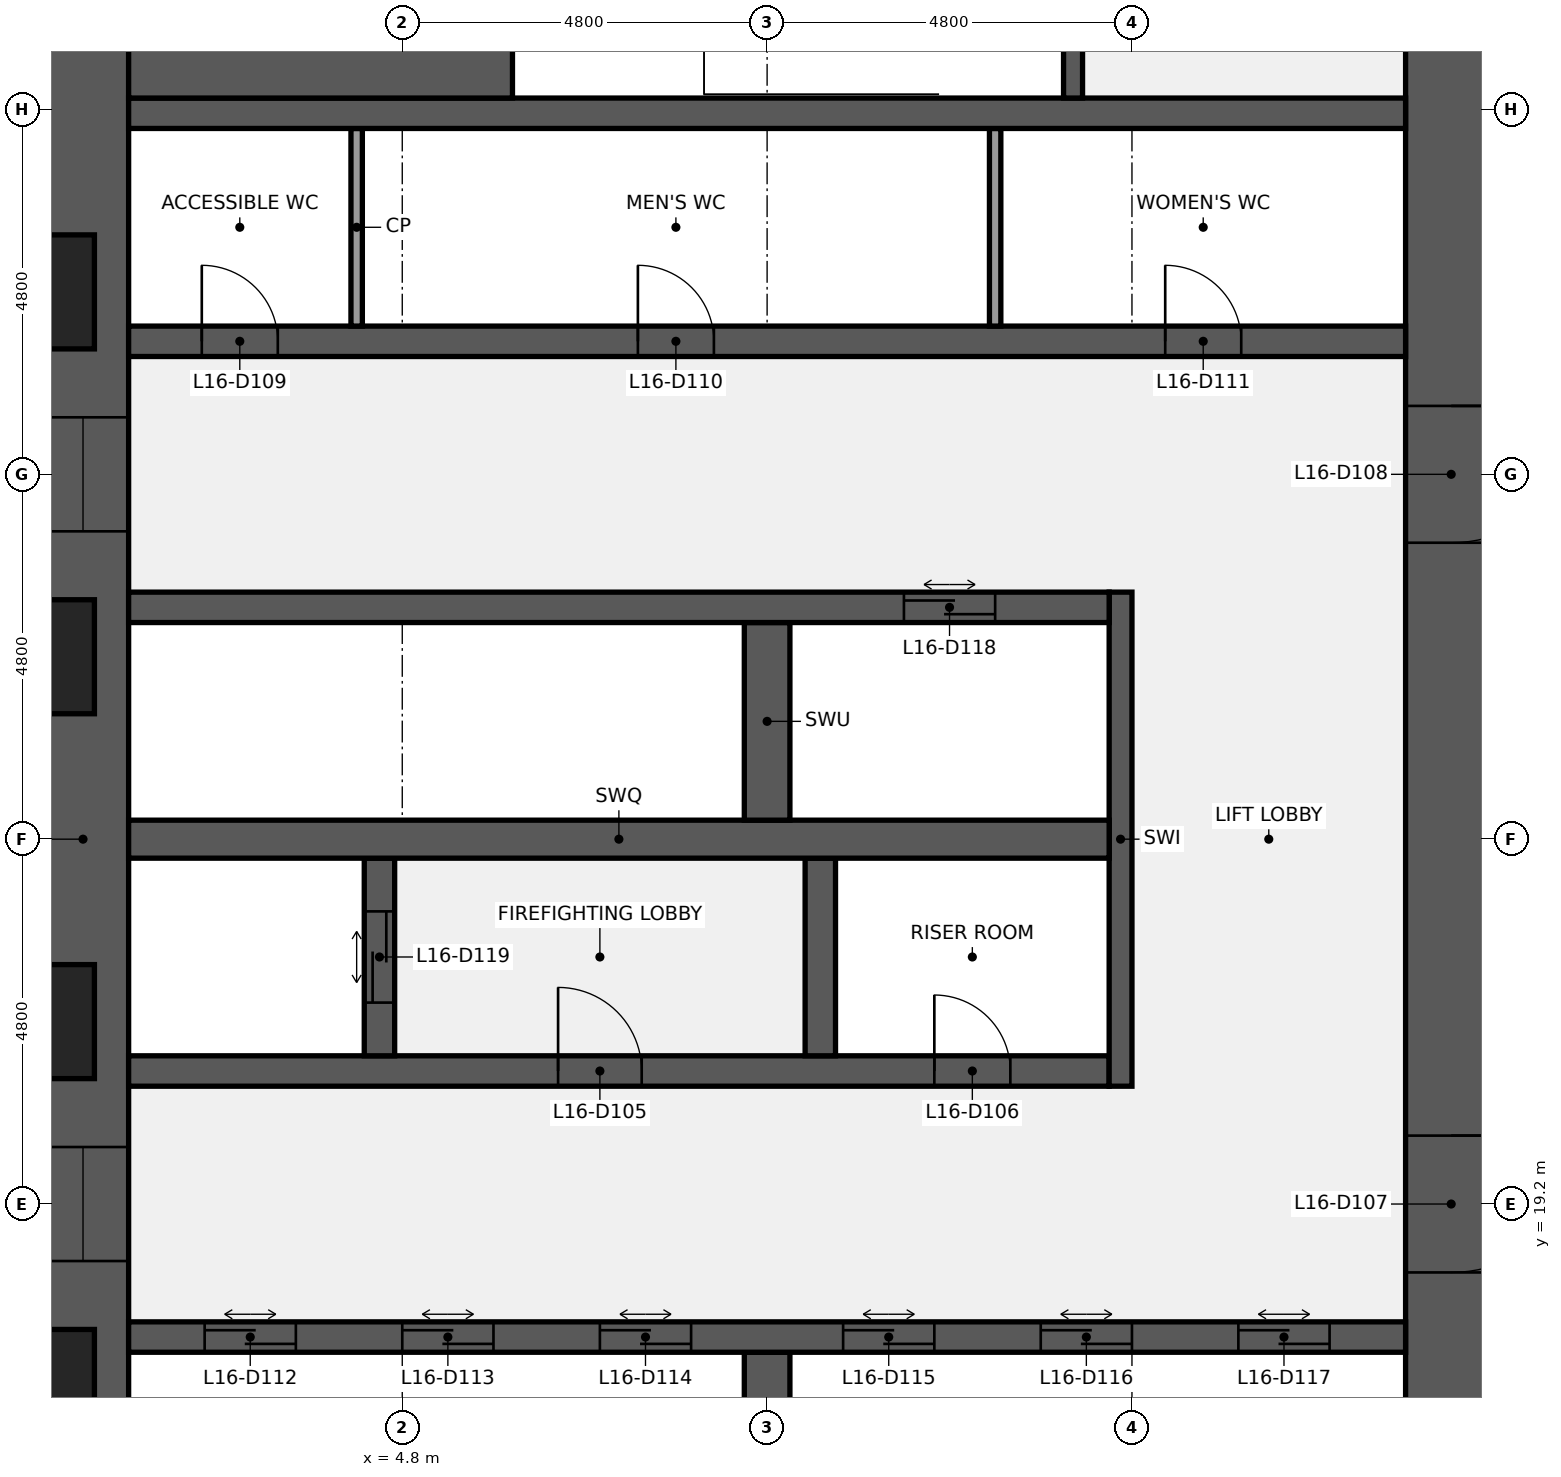
"""IFC4 building model, lengths in metres.
Left out: names, types, materials, properties, quantities, classifications, styles, units other than length and angle.
Written with IfcOpenShell. Run it as: python <this file> out.ifc"""

import sys

from ifc_helpers import new_model, si_unit, direction, frame, frame_2d, origin, place, context, subcontext, project, spatial, rectangle, extrude, element, fill, save


model = new_model("IFC4")
c1 = context("Model", 3, precision=1e-05, world=origin(), true_north=direction((0.0, 1.0)))
c2 = subcontext(c1, "Body", "Model", "MODEL_VIEW")
j1 = project(units=[si_unit("LENGTHUNIT", "METRE"), si_unit("PLANEANGLEUNIT", "RADIAN")], contexts=[c1])
p1 = place(None, origin())
s1 = spatial("IfcSite", under=j1, at=p1, CompositionType="ELEMENT")
p2 = place(p1, origin())
s2 = spatial("IfcBuilding", under=s1, at=p2, CompositionType="ELEMENT")
p3 = place(p2, frame((0.0, 0.0, 75.0)))
s3 = spatial("IfcBuildingStorey", under=s2, at=p3, CompositionType="ELEMENT", Elevation=75.0)
p4 = place(p3, frame((0.6, 9.6, 0.0), z_axis=(0.0, 0.0, 1.0), x_axis=(0.0, 1.0, 0.0)))
e1 = element("IfcWall", 1, at=p4, inside=s3, PredefinedType="SHEAR", context=c2, shape_type="SweptSolid", body=[
    extrude(rectangle(XDim=28.8, YDim=1.2, at=frame_2d((14.4, 0.0))), origin(), (0.0, 0.0, 1.0), 3.84),
])
p5 = place(p4, frame((8.85, 0.0, 0.9)))
e2 = element("IfcOpeningElement", 2, at=p5, cuts=e1, PredefinedType="OPENING", context=c2, shape_type="SweptSolid", body=[
    extrude(rectangle(XDim=1.5, YDim=1.5, at=frame_2d((0.75, 0.75))), frame((0.0, 0.61, 0.0), z_axis=(0.0, -1.0, 0.0), x_axis=(1.0, 0.0, 0.0)), (0.0, 0.0, 1.0), 1.22),
])
p6 = place(p4, frame((18.45, 0.0, 0.9)))
e3 = element("IfcOpeningElement", 3, at=p6, cuts=e1, PredefinedType="OPENING", context=c2, shape_type="SweptSolid", body=[
    extrude(rectangle(XDim=1.5, YDim=1.5, at=frame_2d((0.75, 0.75))), frame((0.0, 0.61, 0.0), z_axis=(0.0, -1.0, 0.0), x_axis=(1.0, 0.0, 0.0)), (0.0, 0.0, 1.0), 1.22),
])
p7 = place(p3, frame((18.6, 38.4, 0.0), z_axis=(0.0, 0.0, 1.0), x_axis=(0.0, -1.0, 0.0)))
e4 = element("IfcWall", 4, at=p7, inside=s3, PredefinedType="SHEAR", context=c2, shape_type="SweptSolid", body=[
    extrude(rectangle(XDim=28.8, YDim=1.2, at=frame_2d((14.4, 0.0))), origin(), (0.0, 0.0, 1.0), 3.84),
])
p8 = place(p7, frame((18.3, 0.0, 0.0)))
e5 = element("IfcOpeningElement", 5, at=p8, cuts=e4, PredefinedType="OPENING", context=c2, shape_type="SweptSolid", body=[
    extrude(rectangle(XDim=1.8, YDim=2.1, at=frame_2d((0.9, 1.05))), frame((0.0, 0.61, 0.0), z_axis=(0.0, -1.0, 0.0), x_axis=(1.0, 0.0, 0.0)), (0.0, 0.0, 1.0), 1.22),
])
p9 = place(p7, frame((8.7, 0.0, 0.0)))
e6 = element("IfcOpeningElement", 6, at=p9, cuts=e4, PredefinedType="OPENING", context=c2, shape_type="SweptSolid", body=[
    extrude(rectangle(XDim=1.8, YDim=2.1, at=frame_2d((0.9, 1.05))), frame((0.0, 0.61, 0.0), z_axis=(0.0, -1.0, 0.0), x_axis=(1.0, 0.0, 0.0)), (0.0, 0.0, 1.0), 1.22),
])
p10 = place(p3, frame((9.6, 14.65, 0.0), z_axis=(0.0, 0.0, 1.0), x_axis=(0.0, 1.0, 0.0)))
e7 = element("IfcWall", 7, at=p10, inside=s3, PredefinedType="SHEAR", context=c2, shape_type="SweptSolid", body=[
    extrude(rectangle(XDim=2.6, YDim=0.6, at=frame_2d((1.3, 0.0))), origin(), (0.0, 0.0, 1.0), 3.84),
])
p11 = place(p3, frame((1.2, 17.45, 0.0), z_axis=(0.0, 0.0, 1.0), x_axis=(1.0, 0.0, 0.0)))
e8 = element("IfcWall", 8, at=p11, inside=s3, PredefinedType="SHEAR", context=c2, shape_type="SweptSolid", body=[
    extrude(rectangle(XDim=16.8, YDim=0.4, at=frame_2d((8.4, 0.0))), origin(), (0.0, 0.0, 1.0), 3.84),
])
p12 = place(p11, frame((1.0, 0.0, 0.0)))
e9 = element("IfcOpeningElement", 9, at=p12, cuts=e8, PredefinedType="OPENING", context=c2, shape_type="SweptSolid", body=[
    extrude(rectangle(XDim=1.2, YDim=2.1, at=frame_2d((0.6, 1.05))), frame((0.0, 0.21, 0.0), z_axis=(0.0, -1.0, 0.0), x_axis=(1.0, 0.0, 0.0)), (0.0, 0.0, 1.0), 0.42),
])
p13 = place(p11, frame((3.6, 0.0, 0.0)))
e10 = element("IfcOpeningElement", 10, at=p13, cuts=e8, PredefinedType="OPENING", context=c2, shape_type="SweptSolid", body=[
    extrude(rectangle(XDim=1.2, YDim=2.1, at=frame_2d((0.6, 1.05))), frame((0.0, 0.21, 0.0), z_axis=(0.0, -1.0, 0.0), x_axis=(1.0, 0.0, 0.0)), (0.0, 0.0, 1.0), 0.42),
])
p14 = place(p11, frame((6.2, 0.0, 0.0)))
e11 = element("IfcOpeningElement", 11, at=p14, cuts=e8, PredefinedType="OPENING", context=c2, shape_type="SweptSolid", body=[
    extrude(rectangle(XDim=1.2, YDim=2.1, at=frame_2d((0.6, 1.05))), frame((0.0, 0.21, 0.0), z_axis=(0.0, -1.0, 0.0), x_axis=(1.0, 0.0, 0.0)), (0.0, 0.0, 1.0), 0.42),
])
p15 = place(p11, frame((9.4, 0.0, 0.0)))
e12 = element("IfcOpeningElement", 12, at=p15, cuts=e8, PredefinedType="OPENING", context=c2, shape_type="SweptSolid", body=[
    extrude(rectangle(XDim=1.2, YDim=2.1, at=frame_2d((0.6, 1.05))), frame((0.0, 0.21, 0.0), z_axis=(0.0, -1.0, 0.0), x_axis=(1.0, 0.0, 0.0)), (0.0, 0.0, 1.0), 0.42),
])
p16 = place(p11, frame((12.0, 0.0, 0.0)))
e13 = element("IfcOpeningElement", 13, at=p16, cuts=e8, PredefinedType="OPENING", context=c2, shape_type="SweptSolid", body=[
    extrude(rectangle(XDim=1.2, YDim=2.1, at=frame_2d((0.6, 1.05))), frame((0.0, 0.21, 0.0), z_axis=(0.0, -1.0, 0.0), x_axis=(1.0, 0.0, 0.0)), (0.0, 0.0, 1.0), 0.42),
])
p17 = place(p11, frame((14.6, 0.0, 0.0)))
e14 = element("IfcOpeningElement", 14, at=p17, cuts=e8, PredefinedType="OPENING", context=c2, shape_type="SweptSolid", body=[
    extrude(rectangle(XDim=1.2, YDim=2.1, at=frame_2d((0.6, 1.05))), frame((0.0, 0.21, 0.0), z_axis=(0.0, -1.0, 0.0), x_axis=(1.0, 0.0, 0.0)), (0.0, 0.0, 1.0), 0.42),
])
p18 = place(p3, frame((1.2, 20.95, 0.0), z_axis=(0.0, 0.0, 1.0), x_axis=(1.0, 0.0, 0.0)))
e15 = element("IfcWall", 15, at=p18, inside=s3, PredefinedType="SHEAR", context=c2, shape_type="SweptSolid", body=[
    extrude(rectangle(XDim=12.9, YDim=0.4, at=frame_2d((6.45, 0.0))), origin(), (0.0, 0.0, 1.0), 3.84),
])
p19 = place(p18, frame((5.65, 0.0, 0.0)))
e16 = element("IfcOpeningElement", 16, at=p19, cuts=e15, PredefinedType="OPENING", context=c2, shape_type="SweptSolid", body=[
    extrude(rectangle(XDim=1.1, YDim=2.1, at=frame_2d((0.55, 1.05))), frame((0.0, 0.21, 0.0), z_axis=(0.0, -1.0, 0.0), x_axis=(1.0, 0.0, 0.0)), (0.0, 0.0, 1.0), 0.42),
])
p20 = place(p18, frame((10.6, 0.0, 0.0)))
e17 = element("IfcOpeningElement", 17, at=p20, cuts=e15, PredefinedType="OPENING", context=c2, shape_type="SweptSolid", body=[
    extrude(rectangle(XDim=1.0, YDim=2.1, at=frame_2d((0.5, 1.05))), frame((0.0, 0.21, 0.0), z_axis=(0.0, -1.0, 0.0), x_axis=(1.0, 0.0, 0.0)), (0.0, 0.0, 1.0), 0.42),
])
p21 = place(p3, frame((14.25, 20.75, 0.0), z_axis=(0.0, 0.0, 1.0), x_axis=(0.0, 1.0, 0.0)))
e18 = element("IfcWall", 18, at=p21, inside=s3, PredefinedType="SHEAR", context=c2, shape_type="SweptSolid", body=[
    extrude(rectangle(XDim=6.5, YDim=0.3, at=frame_2d((3.25, 0.0))), origin(), (0.0, 0.0, 1.0), 3.84),
])
p22 = place(p3, frame((4.5, 21.15, 0.0), z_axis=(0.0, 0.0, 1.0), x_axis=(0.0, 1.0, 0.0)))
e19 = element("IfcWall", 19, at=p22, inside=s3, PredefinedType="SHEAR", context=c2, shape_type="SweptSolid", body=[
    extrude(rectangle(XDim=2.6, YDim=0.4, at=frame_2d((1.3, 0.0))), origin(), (0.0, 0.0, 1.0), 3.84),
])
p23 = place(p22, frame((0.7, 0.0, 0.0)))
e20 = element("IfcOpeningElement", 20, at=p23, cuts=e19, PredefinedType="OPENING", context=c2, shape_type="SweptSolid", body=[
    extrude(rectangle(XDim=1.2, YDim=2.1, at=frame_2d((0.6, 1.05))), frame((0.0, 0.21, 0.0), z_axis=(0.0, -1.0, 0.0), x_axis=(1.0, 0.0, 0.0)), (0.0, 0.0, 1.0), 0.42),
])
p24 = place(p3, frame((10.3, 21.15, 0.0), z_axis=(0.0, 0.0, 1.0), x_axis=(0.0, 1.0, 0.0)))
e21 = element("IfcWall", 21, at=p24, inside=s3, PredefinedType="SHEAR", context=c2, shape_type="SweptSolid", body=[
    extrude(rectangle(XDim=2.6, YDim=0.4, at=frame_2d((1.3, 0.0))), origin(), (0.0, 0.0, 1.0), 3.84),
])
p25 = place(p3, frame((1.2, 24.0, 0.0), z_axis=(0.0, 0.0, 1.0), x_axis=(1.0, 0.0, 0.0)))
e22 = element("IfcWall", 22, at=p25, inside=s3, PredefinedType="SHEAR", context=c2, shape_type="SweptSolid", body=[
    extrude(rectangle(XDim=12.9, YDim=0.5, at=frame_2d((6.45, 0.0))), origin(), (0.0, 0.0, 1.0), 3.84),
])
p26 = place(p3, frame((9.6, 24.25, 0.0), z_axis=(0.0, 0.0, 1.0), x_axis=(0.0, 1.0, 0.0)))
e23 = element("IfcWall", 23, at=p26, inside=s3, PredefinedType="SHEAR", context=c2, shape_type="SweptSolid", body=[
    extrude(rectangle(XDim=2.6, YDim=0.6, at=frame_2d((1.3, 0.0))), origin(), (0.0, 0.0, 1.0), 3.84),
])
p27 = place(p3, frame((1.2, 27.05, 0.0), z_axis=(0.0, 0.0, 1.0), x_axis=(1.0, 0.0, 0.0)))
e24 = element("IfcWall", 24, at=p27, inside=s3, PredefinedType="SHEAR", context=c2, shape_type="SweptSolid", body=[
    extrude(rectangle(XDim=12.9, YDim=0.4, at=frame_2d((6.45, 0.0))), origin(), (0.0, 0.0, 1.0), 3.84),
])
p28 = place(p27, frame((10.2, 0.0, 0.0)))
e25 = element("IfcOpeningElement", 25, at=p28, cuts=e24, PredefinedType="OPENING", context=c2, shape_type="SweptSolid", body=[
    extrude(rectangle(XDim=1.2, YDim=2.1, at=frame_2d((0.6, 1.05))), frame((0.0, 0.21, 0.0), z_axis=(0.0, -1.0, 0.0), x_axis=(1.0, 0.0, 0.0)), (0.0, 0.0, 1.0), 0.42),
])
p29 = place(p3, frame((1.2, 30.55, 0.0), z_axis=(0.0, 0.0, 1.0), x_axis=(1.0, 0.0, 0.0)))
e26 = element("IfcWall", 26, at=p29, inside=s3, PredefinedType="SHEAR", context=c2, shape_type="SweptSolid", body=[
    extrude(rectangle(XDim=16.8, YDim=0.4, at=frame_2d((8.4, 0.0))), origin(), (0.0, 0.0, 1.0), 3.84),
])
p30 = place(p29, frame((0.962, 0.0, 0.0)))
e27 = element("IfcOpeningElement", 27, at=p30, cuts=e26, PredefinedType="OPENING", context=c2, shape_type="SweptSolid", body=[
    extrude(rectangle(XDim=1.0, YDim=2.1, at=frame_2d((0.5, 1.05))), frame((0.0, 0.21, 0.0), z_axis=(0.0, -1.0, 0.0), x_axis=(1.0, 0.0, 0.0)), (0.0, 0.0, 1.0), 0.42),
])
p31 = place(p29, frame((6.7, 0.0, 0.0)))
e28 = element("IfcOpeningElement", 28, at=p31, cuts=e26, PredefinedType="OPENING", context=c2, shape_type="SweptSolid", body=[
    extrude(rectangle(XDim=1.0, YDim=2.1, at=frame_2d((0.5, 1.05))), frame((0.0, 0.21, 0.0), z_axis=(0.0, -1.0, 0.0), x_axis=(1.0, 0.0, 0.0)), (0.0, 0.0, 1.0), 0.42),
])
p32 = place(p29, frame((13.637, 0.0, 0.0)))
e29 = element("IfcOpeningElement", 29, at=p32, cuts=e26, PredefinedType="OPENING", context=c2, shape_type="SweptSolid", body=[
    extrude(rectangle(XDim=1.0, YDim=2.1, at=frame_2d((0.5, 1.05))), frame((0.0, 0.21, 0.0), z_axis=(0.0, -1.0, 0.0), x_axis=(1.0, 0.0, 0.0)), (0.0, 0.0, 1.0), 0.42),
])
for number, where, z_axis, x_axis in (
    (30, (4.2, 30.75, 0.0), (0.0, 0.0, 1.0), (0.0, 1.0, 0.0)),
    (31, (12.6, 30.75, 0.0), (0.0, 0.0, 1.0), (0.0, 1.0, 0.0)),
):
    element("IfcWall", number, at=place(p3, frame(where, z_axis=z_axis, x_axis=x_axis)), inside=s3, PredefinedType="PARTITIONING", context=c2, shape_type="SweptSolid", body=[
        extrude(rectangle(XDim=2.6, YDim=0.15, at=frame_2d((1.3, 0.0))), origin(), (0.0, 0.0, 1.0), 3.84),
    ])
p33 = place(p3, frame((1.2, 33.55, 0.0), z_axis=(0.0, 0.0, 1.0), x_axis=(1.0, 0.0, 0.0)))
e32 = element("IfcWall", 32, at=p33, inside=s3, PredefinedType="SHEAR", context=c2, shape_type="SweptSolid", body=[
    extrude(rectangle(XDim=16.8, YDim=0.4, at=frame_2d((8.4, 0.0))), origin(), (0.0, 0.0, 1.0), 3.84),
])
p34 = place(p3, frame((1.2, 35.475, 0.0), z_axis=(0.0, 0.0, 1.0), x_axis=(1.0, 0.0, 0.0)))
e33 = element("IfcWall", 33, at=p34, inside=s3, PredefinedType="SHEAR", context=c2, shape_type="SweptSolid", body=[
    extrude(rectangle(XDim=5.05, YDim=3.45, at=frame_2d((2.525, 0.0))), origin(), (0.0, 0.0, 1.0), 3.84),
])
p35 = place(p3, frame((13.625, 33.75, 0.0), z_axis=(0.0, 0.0, 1.0), x_axis=(0.0, 1.0, 0.0)))
e34 = element("IfcWall", 34, at=p35, inside=s3, PredefinedType="SHEAR", context=c2, shape_type="SweptSolid", body=[
    extrude(rectangle(XDim=3.45, YDim=0.25, at=frame_2d((1.725, 0.0))), origin(), (0.0, 0.0, 1.0), 3.84),
])
p36 = place(p35, frame((1.175, 0.0, 0.0)))
e35 = element("IfcOpeningElement", 35, at=p36, cuts=e34, PredefinedType="OPENING", context=c2, shape_type="SweptSolid", body=[
    extrude(rectangle(XDim=1.1, YDim=2.1, at=frame_2d((0.55, 1.05))), frame((0.0, 0.135, 0.0), z_axis=(0.0, -1.0, 0.0), x_axis=(1.0, 0.0, 0.0)), (0.0, 0.0, 1.0), 0.27),
])
p37 = place(p19, origin())
e36 = element("IfcDoor", 36, at=p37, inside=s3, OperationType="SINGLE_SWING_LEFT", PredefinedType="DOOR", context=c2, shape_type="SweptSolid", body=[
    extrude(rectangle(XDim=1.1, YDim=2.1, at=frame_2d((0.55, 1.05))), frame((0.0, 0.025, 0.0), z_axis=(0.0, -1.0, 0.0), x_axis=(1.0, 0.0, 0.0)), (0.0, 0.0, 1.0), 0.05),
])
fill(e16, e36)
p38 = place(p20, origin())
e37 = element("IfcDoor", 37, at=p38, inside=s3, OperationType="SINGLE_SWING_LEFT", PredefinedType="DOOR", context=c2, shape_type="SweptSolid", body=[
    extrude(rectangle(XDim=1.0, YDim=2.1, at=frame_2d((0.5, 1.05))), frame((0.0, 0.025, 0.0), z_axis=(0.0, -1.0, 0.0), x_axis=(1.0, 0.0, 0.0)), (0.0, 0.0, 1.0), 0.05),
])
fill(e17, e37)
p39 = place(p8, origin())
e38 = element("IfcDoor", 38, at=p39, inside=s3, OperationType="DOUBLE_DOOR_SINGLE_SWING", PredefinedType="DOOR", context=c2, shape_type="SweptSolid", body=[
    extrude(rectangle(XDim=1.8, YDim=2.1, at=frame_2d((0.9, 1.05))), frame((0.0, 0.025, 0.0), z_axis=(0.0, -1.0, 0.0), x_axis=(1.0, 0.0, 0.0)), (0.0, 0.0, 1.0), 0.05),
])
fill(e5, e38)
p40 = place(p9, origin())
e39 = element("IfcDoor", 39, at=p40, inside=s3, OperationType="DOUBLE_DOOR_SINGLE_SWING", PredefinedType="DOOR", context=c2, shape_type="SweptSolid", body=[
    extrude(rectangle(XDim=1.8, YDim=2.1, at=frame_2d((0.9, 1.05))), frame((0.0, 0.025, 0.0), z_axis=(0.0, -1.0, 0.0), x_axis=(1.0, 0.0, 0.0)), (0.0, 0.0, 1.0), 0.05),
])
fill(e6, e39)
p41 = place(p30, origin())
e40 = element("IfcDoor", 40, at=p41, inside=s3, OperationType="SINGLE_SWING_LEFT", PredefinedType="DOOR", context=c2, shape_type="SweptSolid", body=[
    extrude(rectangle(XDim=1.0, YDim=2.1, at=frame_2d((0.5, 1.05))), frame((0.0, 0.025, 0.0), z_axis=(0.0, -1.0, 0.0), x_axis=(1.0, 0.0, 0.0)), (0.0, 0.0, 1.0), 0.05),
])
fill(e27, e40)
p42 = place(p31, origin())
e41 = element("IfcDoor", 41, at=p42, inside=s3, OperationType="SINGLE_SWING_LEFT", PredefinedType="DOOR", context=c2, shape_type="SweptSolid", body=[
    extrude(rectangle(XDim=1.0, YDim=2.1, at=frame_2d((0.5, 1.05))), frame((0.0, 0.025, 0.0), z_axis=(0.0, -1.0, 0.0), x_axis=(1.0, 0.0, 0.0)), (0.0, 0.0, 1.0), 0.05),
])
fill(e28, e41)
p43 = place(p32, origin())
e42 = element("IfcDoor", 42, at=p43, inside=s3, OperationType="SINGLE_SWING_LEFT", PredefinedType="DOOR", context=c2, shape_type="SweptSolid", body=[
    extrude(rectangle(XDim=1.0, YDim=2.1, at=frame_2d((0.5, 1.05))), frame((0.0, 0.025, 0.0), z_axis=(0.0, -1.0, 0.0), x_axis=(1.0, 0.0, 0.0)), (0.0, 0.0, 1.0), 0.05),
])
fill(e29, e42)
p44 = place(p12, origin())
e43 = element("IfcDoor", 43, at=p44, inside=s3, OperationType="DOUBLE_DOOR_SLIDING", PredefinedType="DOOR", context=c2, shape_type="SweptSolid", body=[
    extrude(rectangle(XDim=1.2, YDim=2.1, at=frame_2d((0.6, 1.05))), frame((0.0, 0.025, 0.0), z_axis=(0.0, -1.0, 0.0), x_axis=(1.0, 0.0, 0.0)), (0.0, 0.0, 1.0), 0.05),
])
fill(e9, e43)
p45 = place(p13, origin())
e44 = element("IfcDoor", 44, at=p45, inside=s3, OperationType="DOUBLE_DOOR_SLIDING", PredefinedType="DOOR", context=c2, shape_type="SweptSolid", body=[
    extrude(rectangle(XDim=1.2, YDim=2.1, at=frame_2d((0.6, 1.05))), frame((0.0, 0.025, 0.0), z_axis=(0.0, -1.0, 0.0), x_axis=(1.0, 0.0, 0.0)), (0.0, 0.0, 1.0), 0.05),
])
fill(e10, e44)
p46 = place(p14, origin())
e45 = element("IfcDoor", 45, at=p46, inside=s3, OperationType="DOUBLE_DOOR_SLIDING", PredefinedType="DOOR", context=c2, shape_type="SweptSolid", body=[
    extrude(rectangle(XDim=1.2, YDim=2.1, at=frame_2d((0.6, 1.05))), frame((0.0, 0.025, 0.0), z_axis=(0.0, -1.0, 0.0), x_axis=(1.0, 0.0, 0.0)), (0.0, 0.0, 1.0), 0.05),
])
fill(e11, e45)
p47 = place(p15, origin())
e46 = element("IfcDoor", 46, at=p47, inside=s3, OperationType="DOUBLE_DOOR_SLIDING", PredefinedType="DOOR", context=c2, shape_type="SweptSolid", body=[
    extrude(rectangle(XDim=1.2, YDim=2.1, at=frame_2d((0.6, 1.05))), frame((0.0, 0.025, 0.0), z_axis=(0.0, -1.0, 0.0), x_axis=(1.0, 0.0, 0.0)), (0.0, 0.0, 1.0), 0.05),
])
fill(e12, e46)
p48 = place(p16, origin())
e47 = element("IfcDoor", 47, at=p48, inside=s3, OperationType="DOUBLE_DOOR_SLIDING", PredefinedType="DOOR", context=c2, shape_type="SweptSolid", body=[
    extrude(rectangle(XDim=1.2, YDim=2.1, at=frame_2d((0.6, 1.05))), frame((0.0, 0.025, 0.0), z_axis=(0.0, -1.0, 0.0), x_axis=(1.0, 0.0, 0.0)), (0.0, 0.0, 1.0), 0.05),
])
fill(e13, e47)
p49 = place(p17, origin())
e48 = element("IfcDoor", 48, at=p49, inside=s3, OperationType="DOUBLE_DOOR_SLIDING", PredefinedType="DOOR", context=c2, shape_type="SweptSolid", body=[
    extrude(rectangle(XDim=1.2, YDim=2.1, at=frame_2d((0.6, 1.05))), frame((0.0, 0.025, 0.0), z_axis=(0.0, -1.0, 0.0), x_axis=(1.0, 0.0, 0.0)), (0.0, 0.0, 1.0), 0.05),
])
fill(e14, e48)
p50 = place(p28, origin())
e49 = element("IfcDoor", 49, at=p50, inside=s3, OperationType="DOUBLE_DOOR_SLIDING", PredefinedType="DOOR", context=c2, shape_type="SweptSolid", body=[
    extrude(rectangle(XDim=1.2, YDim=2.1, at=frame_2d((0.6, 1.05))), frame((0.0, 0.025, 0.0), z_axis=(0.0, -1.0, 0.0), x_axis=(1.0, 0.0, 0.0)), (0.0, 0.0, 1.0), 0.05),
])
fill(e25, e49)
p51 = place(p23, origin())
e50 = element("IfcDoor", 50, at=p51, inside=s3, OperationType="DOUBLE_DOOR_SLIDING", PredefinedType="DOOR", context=c2, shape_type="SweptSolid", body=[
    extrude(rectangle(XDim=1.2, YDim=2.1, at=frame_2d((0.6, 1.05))), frame((0.0, 0.025, 0.0), z_axis=(0.0, -1.0, 0.0), x_axis=(1.0, 0.0, 0.0)), (0.0, 0.0, 1.0), 0.05),
])
fill(e20, e50)
p52 = place(p5, origin())
e51 = element("IfcWindow", 51, at=p52, inside=s3, PartitioningType="SINGLE_PANEL", PredefinedType="WINDOW", context=c2, shape_type="SweptSolid", body=[
    extrude(rectangle(XDim=1.5, YDim=1.5, at=frame_2d((0.75, 0.75))), frame((0.0, 0.03, 0.0), z_axis=(0.0, -1.0, 0.0), x_axis=(1.0, 0.0, 0.0)), (0.0, 0.0, 1.0), 0.06),
])
fill(e2, e51)
p53 = place(p6, origin())
e52 = element("IfcWindow", 52, at=p53, inside=s3, PartitioningType="SINGLE_PANEL", PredefinedType="WINDOW", context=c2, shape_type="SweptSolid", body=[
    extrude(rectangle(XDim=1.5, YDim=1.5, at=frame_2d((0.75, 0.75))), frame((0.0, 0.03, 0.0), z_axis=(0.0, -1.0, 0.0), x_axis=(1.0, 0.0, 0.0)), (0.0, 0.0, 1.0), 0.06),
])
fill(e3, e52)
save(model, sys.argv[1])
